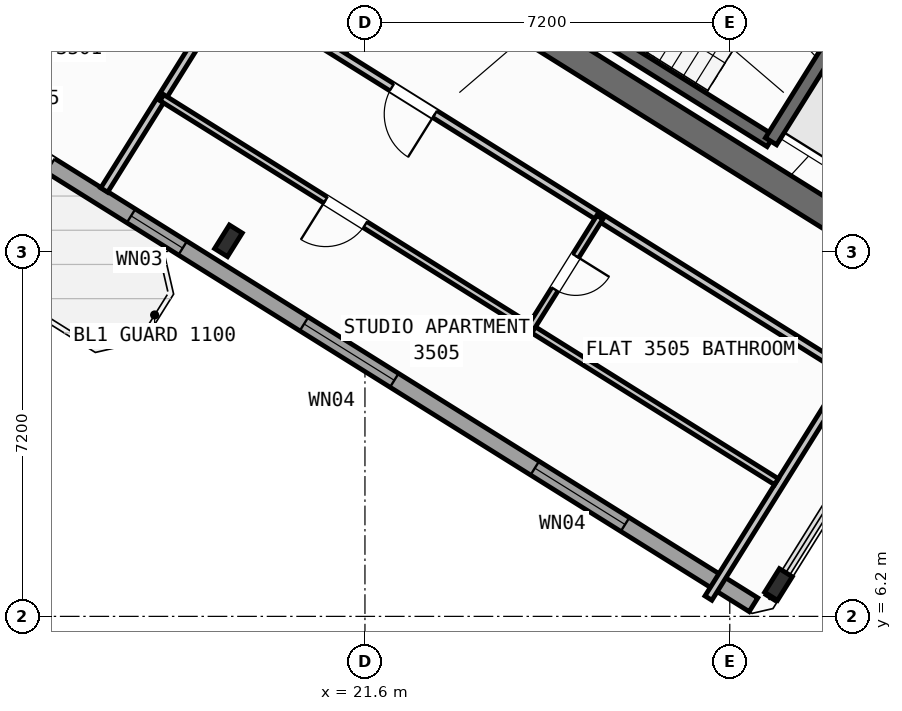
"""IFC4 building model, lengths in metres.
Left out: names, types, materials, properties, quantities, classifications, styles, units other than length and angle.
Written with IfcOpenShell. Run it as: python <this file> out.ifc"""

import sys

from ifc_helpers import new_model, si_unit, direction, frame, frame_2d, origin, origin_2d, place, context, subcontext, project, spatial, rectangle, i_section, extrude, source, transform, mapped, element, fill, save


model = new_model("IFC4")
c1 = context("Model", 3, precision=1e-05, world=origin(), true_north=direction((0.0, 1.0)))
c2 = subcontext(c1, "Body", "Model", "MODEL_VIEW")
j1 = project(units=[si_unit("LENGTHUNIT", "METRE"), si_unit("PLANEANGLEUNIT", "RADIAN")], contexts=[c1])
p1 = place(None, origin())
s1 = spatial("IfcSite", under=j1, at=p1, CompositionType="ELEMENT")
p2 = place(p1, origin())
s2 = spatial("IfcBuilding", under=s1, at=p2, CompositionType="ELEMENT")
p3 = place(p2, frame((0.0, 0.0, 140.7)))
s3 = spatial("IfcBuildingStorey", under=s2, at=p3, CompositionType="ELEMENT", Elevation=140.7)
p4 = place(p3, frame((33.366, 12.477, 0.0), z_axis=(0.0, 0.0, 1.0), x_axis=(-0.848047359947, 0.529920442413, 0.0)))
e1 = element("IfcWall", 1, at=p4, inside=s3, PredefinedType="SHEAR", context=c2, shape_type="SweptSolid", body=[
    extrude(rectangle(XDim=13.14, YDim=0.55, at=frame_2d((6.57, 0.0))), origin(), (0.0, 0.0, 1.0), 3.35),
])
m1 = source(origin(), c2, "Body", "SweptSolid", [
    extrude(i_section(OverallWidth=0.3, OverallDepth=0.55, WebThickness=0.015, FlangeThickness=0.029, at=origin_2d()), origin(), (0.0, 0.0, 1.0), 3.6),
])
for number, where, z_axis, x_axis in (
    (2, (29.761, 6.829, 0.0), (0.0, 0.0, 1.0), (-0.848, 0.53, 0.0)),
    (3, (18.906, 13.612, 0.0), (0.0, 0.0, 1.0), (-0.848, 0.53, 0.0)),
):
    element("IfcColumn", number, at=place(p3, frame(where, z_axis=z_axis, x_axis=x_axis)), inside=s3, PredefinedType="COLUMN", context=c2, shape_type="MappedRepresentation", body=[
        mapped(m1, transform((0.0, 0.0, 0.0), scale=1.0)),
    ])
p5 = place(p3, frame((29.268, 6.429, 0.0), z_axis=(0.0, 0.0, 1.0), x_axis=(-0.848049971435, 0.529916263149, 0.0)))
e4 = element("IfcWall", 4, at=p5, inside=s3, PredefinedType="STANDARD", context=c2, shape_type="SweptSolid", body=[
    extrude(rectangle(XDim=31.588, YDim=0.32, at=frame_2d((15.794, 0.0))), origin(), (0.0, 0.0, 1.0), 3.35),
])
p6 = place(p5, frame((16.362, 0.0, 0.0)))
e5 = element("IfcOpeningElement", 5, at=p6, cuts=e4, PredefinedType="OPENING", context=c2, shape_type="SweptSolid", body=[
    extrude(rectangle(XDim=1.2, YDim=2.15, at=frame_2d((0.6, 1.075))), frame((0.0, 0.17, 0.0), z_axis=(0.0, -1.0, 0.0), x_axis=(1.0, 0.0, 0.0)), (0.0, 0.0, 1.0), 0.34),
])
p7 = place(p5, frame((2.989, 0.0, 0.8)))
e6 = element("IfcOpeningElement", 6, at=p7, cuts=e4, PredefinedType="OPENING", context=c2, shape_type="SweptSolid", body=[
    extrude(rectangle(XDim=2.1, YDim=1.55, at=frame_2d((1.05, 0.775))), frame((0.0, 0.17, 0.0), z_axis=(0.0, -1.0, 0.0), x_axis=(1.0, 0.0, 0.0)), (0.0, 0.0, 1.0), 0.34),
])
p8 = place(p5, frame((8.359, 0.0, 0.8)))
e7 = element("IfcOpeningElement", 7, at=p8, cuts=e4, PredefinedType="OPENING", context=c2, shape_type="SweptSolid", body=[
    extrude(rectangle(XDim=2.1, YDim=1.55, at=frame_2d((1.05, 0.775))), frame((0.0, 0.17, 0.0), z_axis=(0.0, -1.0, 0.0), x_axis=(1.0, 0.0, 0.0)), (0.0, 0.0, 1.0), 0.34),
])
p9 = place(p5, frame((13.284, 0.0, 0.95)))
e8 = element("IfcOpeningElement", 8, at=p9, cuts=e4, PredefinedType="OPENING", context=c2, shape_type="SweptSolid", body=[
    extrude(rectangle(XDim=1.2, YDim=1.4, at=frame_2d((0.6, 0.7))), frame((0.0, 0.17, 0.0), z_axis=(0.0, -1.0, 0.0), x_axis=(1.0, 0.0, 0.0)), (0.0, 0.0, 1.0), 0.34),
])
p10 = place(p5, frame((29.188, 0.0, 0.95)))
e9 = element("IfcOpeningElement", 9, at=p10, cuts=e4, PredefinedType="OPENING", context=c2, shape_type="SweptSolid", body=[
    extrude(rectangle(XDim=1.2, YDim=1.4, at=frame_2d((0.6, 0.7))), frame((0.0, 0.17, 0.0), z_axis=(0.0, -1.0, 0.0), x_axis=(1.0, 0.0, 0.0)), (0.0, 0.0, 1.0), 0.34),
])
p11 = place(p5, frame((19.674, 0.0, 1.0)))
e10 = element("IfcOpeningElement", 10, at=p11, cuts=e4, PredefinedType="OPENING", context=c2, shape_type="SweptSolid", body=[
    extrude(rectangle(XDim=0.9, YDim=1.25, at=frame_2d((0.45, 0.625))), frame((0.0, 0.17, 0.0), z_axis=(0.0, -1.0, 0.0), x_axis=(1.0, 0.0, 0.0)), (0.0, 0.0, 1.0), 0.34),
])
p12 = place(p5, frame((21.896, 0.0, 1.0)))
e11 = element("IfcOpeningElement", 11, at=p12, cuts=e4, PredefinedType="OPENING", context=c2, shape_type="SweptSolid", body=[
    extrude(rectangle(XDim=0.9, YDim=1.25, at=frame_2d((0.45, 0.625))), frame((0.0, 0.17, 0.0), z_axis=(0.0, -1.0, 0.0), x_axis=(1.0, 0.0, 0.0)), (0.0, 0.0, 1.0), 0.34),
])
p13 = place(p5, frame((24.106, 0.0, 1.0)))
e12 = element("IfcOpeningElement", 12, at=p13, cuts=e4, PredefinedType="OPENING", context=c2, shape_type="SweptSolid", body=[
    extrude(rectangle(XDim=0.65, YDim=1.15, at=frame_2d((0.325, 0.575))), frame((0.0, 0.17, 0.0), z_axis=(0.0, -1.0, 0.0), x_axis=(1.0, 0.0, 0.0)), (0.0, 0.0, 1.0), 0.34),
])
p14 = place(p5, frame((26.366, 0.0, 1.0)))
e13 = element("IfcOpeningElement", 13, at=p14, cuts=e4, PredefinedType="OPENING", context=c2, shape_type="SweptSolid", body=[
    extrude(rectangle(XDim=0.9, YDim=1.25, at=frame_2d((0.45, 0.625))), frame((0.0, 0.17, 0.0), z_axis=(0.0, -1.0, 0.0), x_axis=(1.0, 0.0, 0.0)), (0.0, 0.0, 1.0), 0.34),
])
p15 = place(p3, frame((29.605, 15.581, 0.0), z_axis=(0.0, 0.0, 1.0), x_axis=(-0.848036911448, 0.529937163087, 0.0)))
e14 = element("IfcWall", 14, at=p15, inside=s3, PredefinedType="SHEAR", context=c2, shape_type="SweptSolid", body=[
    extrude(rectangle(XDim=7.46, YDim=0.26, at=frame_2d((3.73, 0.0))), origin(), (0.0, 0.0, 1.0), 3.35),
])
p16 = place(p3, frame((31.288, 18.256, 0.0), z_axis=(0.0, 0.0, 1.0), x_axis=(-0.529943379326, -0.848033026897, 0.0)))
e15 = element("IfcWall", 15, at=p16, inside=s3, PredefinedType="SHEAR", context=c2, shape_type="SweptSolid", body=[
    extrude(rectangle(XDim=3.16, YDim=0.26, at=frame_2d((1.58, 0.0))), origin(), (0.0, 0.0, 1.0), 3.35),
])
p17 = place(p3, frame((21.206, 17.292, 0.0), z_axis=(0.0, 0.0, 1.0), x_axis=(-0.848050851465, 0.529914854792, 0.0)))
e16 = element("IfcWall", 16, at=p17, inside=s3, PredefinedType="PARTITIONING", context=c2, shape_type="SweptSolid", body=[
    extrude(rectangle(XDim=2.61, YDim=0.16, at=frame_2d((1.305, 0.0))), origin(), (0.0, 0.0, 1.0), 3.34),
])
p18 = place(p3, frame((21.938, 23.391, 0.0), z_axis=(0.0, 0.0, 1.0), x_axis=(-0.529924725692, -0.848044683434, 0.0)))
e17 = element("IfcWall", 17, at=p18, inside=s3, PredefinedType="PARTITIONING", context=c2, shape_type="SweptSolid", body=[
    extrude(rectangle(XDim=10.35, YDim=0.16, at=frame_2d((5.175, 0.0))), origin(), (0.0, 0.0, 1.0), 3.34),
])
p19 = place(p3, frame((16.519, 21.87, 0.0), z_axis=(0.0, 0.0, 1.0), x_axis=(-0.529922447305, -0.848046107144, 0.0)))
e18 = element("IfcWall", 18, at=p19, inside=s3, PredefinedType="PARTITIONING", context=c2, shape_type="SweptSolid", body=[
    extrude(rectangle(XDim=5.451, YDim=0.16, at=frame_2d((2.726, 0.0))), origin(), (0.0, 0.0, 1.0), 2.775),
])
p20 = place(p3, frame((32.164, 10.374, 0.0), z_axis=(0.0, 0.0, 1.0), x_axis=(-0.848044107957, 0.529925646633, 0.0)))
e19 = element("IfcWall", 19, at=p20, inside=s3, PredefinedType="PARTITIONING", context=c2, shape_type="SweptSolid", body=[
    extrude(rectangle(XDim=15.57, YDim=0.16, at=frame_2d((7.785, 0.0))), origin(), (0.0, 0.0, 1.0), 3.34),
])
p21 = place(p20, frame((10.83, 0.0, 0.0)))
e20 = element("IfcOpeningElement", 20, at=p21, cuts=e19, PredefinedType="OPENING", context=c2, shape_type="SweptSolid", body=[
    extrude(rectangle(XDim=1.0, YDim=2.1, at=frame_2d((0.5, 1.05))), frame((0.0, 0.09, 0.0), z_axis=(0.0, -1.0, 0.0), x_axis=(1.0, 0.0, 0.0)), (0.0, 0.0, 1.0), 0.18),
])
p22 = place(p3, frame((31.282, 11.208, 0.0), z_axis=(0.0, 0.0, 1.0), x_axis=(-0.529938869374, -0.84803584519, 0.0)))
e21 = element("IfcWall", 21, at=p22, inside=s3, PredefinedType="PARTITIONING", context=c2, shape_type="SweptSolid", body=[
    extrude(rectangle(XDim=5.48, YDim=0.16, at=frame_2d((2.74, 0.0))), origin(), (0.0, 0.0, 1.0), 3.34),
])
p23 = place(p3, frame((29.72, 8.859, 0.0), z_axis=(0.0, 0.0, 1.0), x_axis=(-0.848049134363, 0.529917602752, 0.0)))
e22 = element("IfcWall", 22, at=p23, inside=s3, PredefinedType="PLUMBINGWALL", context=c2, shape_type="SweptSolid", body=[
    extrude(rectangle(XDim=14.3, YDim=0.14, at=frame_2d((7.15, 0.0))), origin(), (0.0, 0.0, 1.0), 3.34),
])
p24 = place(p23, frame((9.57, 0.0, 0.0)))
e23 = element("IfcOpeningElement", 23, at=p24, cuts=e22, PredefinedType="OPENING", context=c2, shape_type="SweptSolid", body=[
    extrude(rectangle(XDim=0.92, YDim=2.08, at=frame_2d((0.46, 1.04))), frame((0.0, 0.08, 0.0), z_axis=(0.0, -1.0, 0.0), x_axis=(1.0, 0.0, 0.0)), (0.0, 0.0, 1.0), 0.16),
])
p25 = place(p3, frame((26.237, 14.078, 0.0), z_axis=(0.0, 0.0, 1.0), x_axis=(-0.52995640672, -0.848024885824, 0.0)))
e24 = element("IfcWall", 24, at=p25, inside=s3, PredefinedType="PLUMBINGWALL", context=c2, shape_type="SweptSolid", body=[
    extrude(rectangle(XDim=2.58, YDim=0.14, at=frame_2d((1.29, 0.0))), origin(), (0.0, 0.0, 1.0), 3.34),
])
p26 = place(p25, frame((0.9, 0.0, 0.0)))
e25 = element("IfcOpeningElement", 25, at=p26, cuts=e24, PredefinedType="OPENING", context=c2, shape_type="SweptSolid", body=[
    extrude(rectangle(XDim=0.78, YDim=2.05, at=frame_2d((0.39, 1.025))), frame((0.0, 0.08, 0.0), z_axis=(0.0, -1.0, 0.0), x_axis=(1.0, 0.0, 0.0)), (0.0, 0.0, 1.0), 0.16),
])
m2 = source(origin(), c2, "Body", "SweptSolid", [
    extrude(rectangle(XDim=2.1, YDim=1.55, at=frame_2d((1.05, 0.775))), frame((0.0, 0.03, 0.0), z_axis=(0.0, -1.0, 0.0), x_axis=(1.0, 0.0, 0.0)), (0.0, 0.0, 1.0), 0.06),
])
p27 = place(p7, origin())
e26 = element("IfcWindow", 26, at=p27, inside=s3, PartitioningType="SINGLE_PANEL", PredefinedType="WINDOW", context=c2, shape_type="MappedRepresentation", body=[
    mapped(m2, transform((0.0, 0.0, 0.0), scale=1.0)),
])
fill(e6, e26)
p28 = place(p8, origin())
e27 = element("IfcWindow", 27, at=p28, inside=s3, PartitioningType="SINGLE_PANEL", PredefinedType="WINDOW", context=c2, shape_type="MappedRepresentation", body=[
    mapped(m2, transform((0.0, 0.0, 0.0), scale=1.0)),
])
fill(e7, e27)
m3 = source(origin(), c2, "Body", "SweptSolid", [
    extrude(rectangle(XDim=1.2, YDim=1.4, at=frame_2d((0.6, 0.7))), frame((0.0, 0.03, 0.0), z_axis=(0.0, -1.0, 0.0), x_axis=(1.0, 0.0, 0.0)), (0.0, 0.0, 1.0), 0.06),
])
p29 = place(p9, origin())
e28 = element("IfcWindow", 28, at=p29, inside=s3, PartitioningType="SINGLE_PANEL", PredefinedType="WINDOW", context=c2, shape_type="MappedRepresentation", body=[
    mapped(m3, transform((0.0, 0.0, 0.0), scale=1.0)),
])
fill(e8, e28)
m4 = source(origin(), c2, "Body", "SweptSolid", [
    extrude(rectangle(XDim=1.0, YDim=2.1, at=frame_2d((0.5, 1.05))), frame((0.0, 0.025, 0.0), z_axis=(0.0, -1.0, 0.0), x_axis=(1.0, 0.0, 0.0)), (0.0, 0.0, 1.0), 0.05),
])
p30 = place(p21, origin())
e29 = element("IfcDoor", 29, at=p30, inside=s3, OperationType="SINGLE_SWING_LEFT", PredefinedType="DOOR", context=c2, shape_type="MappedRepresentation", body=[
    mapped(m4, transform((0.0, 0.0, 0.0), scale=1.0)),
])
fill(e20, e29)
m5 = source(origin(), c2, "Body", "SweptSolid", [
    extrude(rectangle(XDim=0.92, YDim=2.08, at=frame_2d((0.46, 1.04))), frame((0.0, 0.025, 0.0), z_axis=(0.0, -1.0, 0.0), x_axis=(1.0, 0.0, 0.0)), (0.0, 0.0, 1.0), 0.05),
])
p31 = place(p24, origin())
e30 = element("IfcDoor", 30, at=p31, inside=s3, OperationType="SINGLE_SWING_RIGHT", PredefinedType="DOOR", context=c2, shape_type="MappedRepresentation", body=[
    mapped(m5, transform((0.0, 0.0, 0.0), scale=1.0)),
])
fill(e23, e30)
m6 = source(origin(), c2, "Body", "SweptSolid", [
    extrude(rectangle(XDim=0.78, YDim=2.05, at=frame_2d((0.39, 1.025))), frame((0.0, 0.025, 0.0), z_axis=(0.0, -1.0, 0.0), x_axis=(1.0, 0.0, 0.0)), (0.0, 0.0, 1.0), 0.05),
])
p32 = place(p26, origin())
e31 = element("IfcDoor", 31, at=p32, inside=s3, OperationType="SINGLE_SWING_LEFT", PredefinedType="DOOR", context=c2, shape_type="MappedRepresentation", body=[
    mapped(m6, transform((0.0, 0.0, 0.0), scale=1.0)),
])
fill(e25, e31)
save(model, sys.argv[1])
